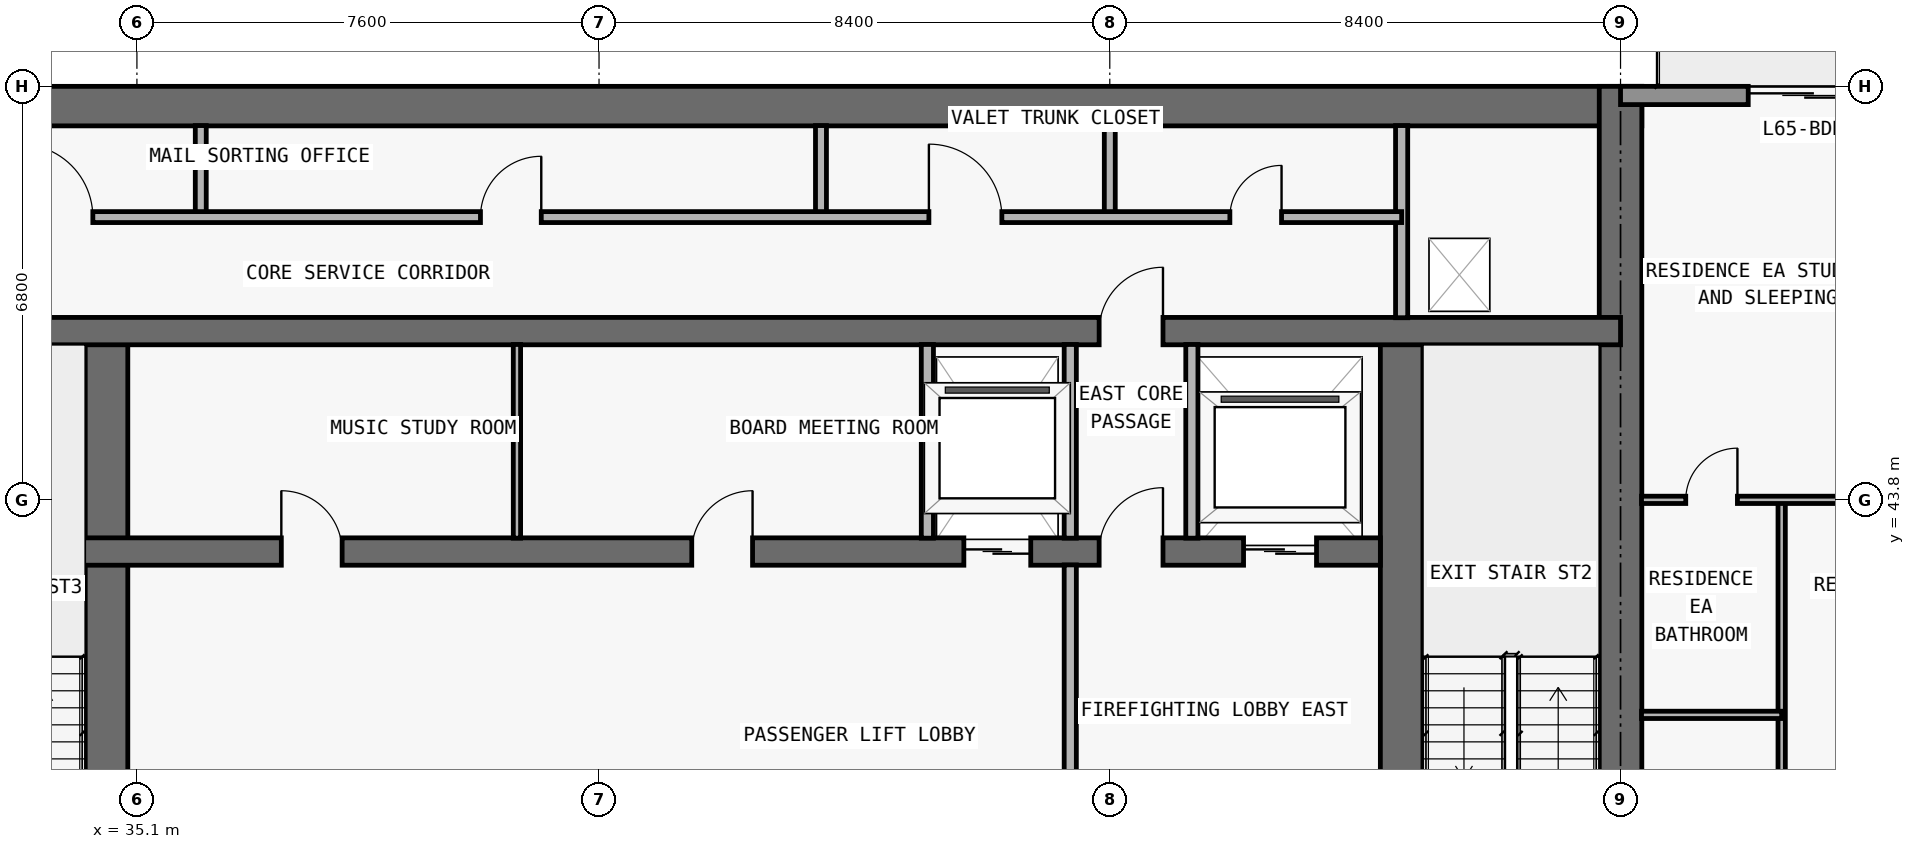
"""IFC4 building model, lengths in metres.
Left out: names, types, materials, properties, quantities, classifications, styles, units other than length and angle.
Written with IfcOpenShell. Run it as: python <this file> out.ifc"""

import sys

from ifc_helpers import new_model, si_unit, direction, frame, frame_2d, origin, place, context, subcontext, project, spatial, rectangle, extrude, element, fill, save


model = new_model("IFC4")
c1 = context("Model", 3, precision=1e-05, world=origin(), true_north=direction((0.0, 1.0)))
c2 = subcontext(c1, "Body", "Model", "MODEL_VIEW")
j1 = project(units=[si_unit("LENGTHUNIT", "METRE"), si_unit("PLANEANGLEUNIT", "RADIAN")], contexts=[c1])
p1 = place(None, origin())
s1 = spatial("IfcSite", under=j1, at=p1, CompositionType="ELEMENT")
p2 = place(p1, origin())
s2 = spatial("IfcBuilding", under=s1, at=p2, CompositionType="ELEMENT")
p3 = place(p2, frame((0.0, 0.0, 233.1)))
s3 = spatial("IfcBuildingStorey", under=s2, at=p3, CompositionType="ELEMENT", Elevation=233.1)
p4 = place(p3, frame((17.95, 50.275, 0.0), z_axis=(0.0, 0.0, 1.0), x_axis=(1.0, 0.0, 0.0)))
e1 = element("IfcWall", 1, at=p4, inside=s3, PredefinedType="SHEAR", context=c2, shape_type="SweptSolid", body=[
    extrude(rectangle(XDim=41.9, YDim=0.65, at=frame_2d((20.95, 0.0))), origin(), (0.0, 0.0, 1.0), 3.05),
])
p5 = place(p3, frame((59.5, 36.65, 0.0), z_axis=(0.0, 0.0, 1.0), x_axis=(0.0, 1.0, 0.0)))
e2 = element("IfcWall", 2, at=p5, inside=s3, PredefinedType="SHEAR", context=c2, shape_type="SweptSolid", body=[
    extrude(rectangle(XDim=13.95, YDim=0.7, at=frame_2d((6.975, 0.0))), origin(), (0.0, 0.0, 1.0), 3.05),
])
p6 = place(p3, frame((55.9, 37.0, 0.0), z_axis=(0.0, 0.0, 1.0), x_axis=(0.0, 1.0, 0.0)))
e3 = element("IfcWall", 3, at=p6, inside=s3, PredefinedType="SHEAR", context=c2, shape_type="SweptSolid", body=[
    extrude(rectangle(XDim=9.575, YDim=0.7, at=frame_2d((4.788, 0.0))), origin(), (0.0, 0.0, 1.0), 3.05),
])
p7 = place(p6, frame((0.55, 0.0, 0.0)))
e4 = element("IfcOpeningElement", 4, at=p7, cuts=e3, PredefinedType="OPENING", context=c2, shape_type="SweptSolid", body=[
    extrude(rectangle(XDim=1.1, YDim=2.15, at=frame_2d((0.55, 1.075))), frame((0.0, 0.36, 0.0), z_axis=(0.0, -1.0, 0.0), x_axis=(1.0, 0.0, 0.0)), (0.0, 0.0, 1.0), 0.72),
])
p8 = place(p3, frame((34.6, 37.0, 0.0), z_axis=(0.0, 0.0, 1.0), x_axis=(0.0, 1.0, 0.0)))
e5 = element("IfcWall", 5, at=p8, inside=s3, PredefinedType="SHEAR", context=c2, shape_type="SweptSolid", body=[
    extrude(rectangle(XDim=9.575, YDim=0.7, at=frame_2d((4.788, 0.0))), origin(), (0.0, 0.0, 1.0), 3.05),
])
p9 = place(p3, frame((22.25, 42.95, 0.0), z_axis=(0.0, 0.0, 1.0), x_axis=(1.0, 0.0, 0.0)))
e6 = element("IfcWall", 6, at=p9, inside=s3, PredefinedType="SHEAR", context=c2, shape_type="SweptSolid", body=[
    extrude(rectangle(XDim=33.3, YDim=0.45, at=frame_2d((16.65, 0.0))), origin(), (0.0, 0.0, 1.0), 3.05),
])
p10 = place(p9, frame((1.05, 0.0, 0.0)))
e7 = element("IfcOpeningElement", 7, at=p10, cuts=e6, PredefinedType="OPENING", context=c2, shape_type="SweptSolid", body=[
    extrude(rectangle(XDim=1.2, YDim=2.2, at=frame_2d((0.6, 1.1))), frame((0.0, 0.235, 0.0), z_axis=(0.0, -1.0, 0.0), x_axis=(1.0, 0.0, 0.0)), (0.0, 0.0, 1.0), 0.47),
])
p11 = place(p9, frame((31.05, 0.0, 0.0)))
e8 = element("IfcOpeningElement", 8, at=p11, cuts=e6, PredefinedType="OPENING", context=c2, shape_type="SweptSolid", body=[
    extrude(rectangle(XDim=1.2, YDim=2.2, at=frame_2d((0.6, 1.1))), frame((0.0, 0.235, 0.0), z_axis=(0.0, -1.0, 0.0), x_axis=(1.0, 0.0, 0.0)), (0.0, 0.0, 1.0), 0.47),
])
p12 = place(p9, frame((26.45, 0.0, 0.0)))
e9 = element("IfcOpeningElement", 9, at=p12, cuts=e6, PredefinedType="OPENING", context=c2, shape_type="SweptSolid", body=[
    extrude(rectangle(XDim=1.1, YDim=2.2, at=frame_2d((0.55, 1.1))), frame((0.0, 0.235, 0.0), z_axis=(0.0, -1.0, 0.0), x_axis=(1.0, 0.0, 0.0)), (0.0, 0.0, 1.0), 0.47),
])
p13 = place(p9, frame((5.95, 0.0, 0.0)))
e10 = element("IfcOpeningElement", 10, at=p13, cuts=e6, PredefinedType="OPENING", context=c2, shape_type="SweptSolid", body=[
    extrude(rectangle(XDim=1.1, YDim=2.2, at=frame_2d((0.55, 1.1))), frame((0.0, 0.235, 0.0), z_axis=(0.0, -1.0, 0.0), x_axis=(1.0, 0.0, 0.0)), (0.0, 0.0, 1.0), 0.47),
])
p14 = place(p9, frame((3.625, 0.0, 0.0)))
e11 = element("IfcOpeningElement", 11, at=p14, cuts=e6, PredefinedType="OPENING", context=c2, shape_type="SweptSolid", body=[
    extrude(rectangle(XDim=1.05, YDim=2.15, at=frame_2d((0.525, 1.075))), frame((0.0, 0.235, 0.0), z_axis=(0.0, -1.0, 0.0), x_axis=(1.0, 0.0, 0.0)), (0.0, 0.0, 1.0), 0.47),
])
p15 = place(p9, frame((28.675, 0.0, 0.0)))
e12 = element("IfcOpeningElement", 12, at=p15, cuts=e6, PredefinedType="OPENING", context=c2, shape_type="SweptSolid", body=[
    extrude(rectangle(XDim=1.05, YDim=2.15, at=frame_2d((0.525, 1.075))), frame((0.0, 0.235, 0.0), z_axis=(0.0, -1.0, 0.0), x_axis=(1.0, 0.0, 0.0)), (0.0, 0.0, 1.0), 0.47),
])
p16 = place(p9, frame((15.225, 0.0, 0.0)))
e13 = element("IfcOpeningElement", 13, at=p16, cuts=e6, PredefinedType="OPENING", context=c2, shape_type="SweptSolid", body=[
    extrude(rectangle(XDim=1.0, YDim=2.2, at=frame_2d((0.5, 1.1))), frame((0.0, 0.235, 0.0), z_axis=(0.0, -1.0, 0.0), x_axis=(1.0, 0.0, 0.0)), (0.0, 0.0, 1.0), 0.47),
])
p17 = place(p9, frame((21.975, 0.0, 0.0)))
e14 = element("IfcOpeningElement", 14, at=p17, cuts=e6, PredefinedType="OPENING", context=c2, shape_type="SweptSolid", body=[
    extrude(rectangle(XDim=1.0, YDim=2.2, at=frame_2d((0.5, 1.1))), frame((0.0, 0.235, 0.0), z_axis=(0.0, -1.0, 0.0), x_axis=(1.0, 0.0, 0.0)), (0.0, 0.0, 1.0), 0.47),
])
p18 = place(p3, frame((18.3, 46.575, 0.0), z_axis=(0.0, 0.0, 1.0), x_axis=(1.0, 0.0, 0.0)))
e15 = element("IfcWall", 15, at=p18, inside=s3, PredefinedType="SHEAR", context=c2, shape_type="SweptSolid", body=[
    extrude(rectangle(XDim=41.2, YDim=0.45, at=frame_2d((20.6, 0.0))), origin(), (0.0, 0.0, 1.0), 3.05),
])
p19 = place(p18, frame((7.575, 0.0, 0.0)))
e16 = element("IfcOpeningElement", 16, at=p19, cuts=e15, PredefinedType="OPENING", context=c2, shape_type="SweptSolid", body=[
    extrude(rectangle(XDim=1.05, YDim=2.15, at=frame_2d((0.525, 1.075))), frame((0.0, 0.235, 0.0), z_axis=(0.0, -1.0, 0.0), x_axis=(1.0, 0.0, 0.0)), (0.0, 0.0, 1.0), 0.47),
])
p20 = place(p18, frame((32.625, 0.0, 0.0)))
e17 = element("IfcOpeningElement", 17, at=p20, cuts=e15, PredefinedType="OPENING", context=c2, shape_type="SweptSolid", body=[
    extrude(rectangle(XDim=1.05, YDim=2.15, at=frame_2d((0.525, 1.075))), frame((0.0, 0.235, 0.0), z_axis=(0.0, -1.0, 0.0), x_axis=(1.0, 0.0, 0.0)), (0.0, 0.0, 1.0), 0.47),
])
p21 = place(p3, frame((59.5, 50.45, 0.0), z_axis=(0.0, 0.0, 1.0), x_axis=(1.0, 0.0, 0.0)))
e18 = element("IfcWall", 18, at=p21, inside=s3, PredefinedType="STANDARD", context=c2, shape_type="SweptSolid", body=[
    extrude(rectangle(XDim=6.2, YDim=0.3, at=frame_2d((3.1, 0.0))), origin(), (0.0, 0.0, 1.0), 3.05),
])
p22 = place(p21, frame((2.1, 0.0, 0.0)))
e19 = element("IfcOpeningElement", 19, at=p22, cuts=e18, PredefinedType="OPENING", context=c2, shape_type="SweptSolid", body=[
    extrude(rectangle(XDim=2.0, YDim=2.3, at=frame_2d((1.0, 1.15))), frame((0.0, 0.16, 0.0), z_axis=(0.0, -1.0, 0.0), x_axis=(1.0, 0.0, 0.0)), (0.0, 0.0, 1.0), 0.32),
])
p23 = place(p3, frame((36.15, 48.45, 0.0), z_axis=(0.0, 0.0, 1.0), x_axis=(0.0, 1.0, 0.0)))
e20 = element("IfcWall", 20, at=p23, inside=s3, PredefinedType="PARTITIONING", context=c2, shape_type="SweptSolid", body=[
    extrude(rectangle(XDim=1.505, YDim=0.18, at=frame_2d((0.752, 0.0))), origin(), (0.0, 0.0, 1.0), 3.05),
])
p24 = place(p3, frame((41.35, 43.17, 0.0), z_axis=(0.0, 0.0, 1.0), x_axis=(0.0, 1.0, 0.0)))
e21 = element("IfcWall", 21, at=p24, inside=s3, PredefinedType="PARTITIONING", context=c2, shape_type="SweptSolid", body=[
    extrude(rectangle(XDim=3.185, YDim=0.12, at=frame_2d((1.593, 0.0))), origin(), (0.0, 0.0, 1.0), 3.05),
])
p25 = place(p3, frame((46.35, 48.45, 0.0), z_axis=(0.0, 0.0, 1.0), x_axis=(0.0, 1.0, 0.0)))
e22 = element("IfcWall", 22, at=p25, inside=s3, PredefinedType="PARTITIONING", context=c2, shape_type="SweptSolid", body=[
    extrude(rectangle(XDim=1.505, YDim=0.18, at=frame_2d((0.752, 0.0))), origin(), (0.0, 0.0, 1.0), 3.05),
])
p26 = place(p3, frame((48.1, 43.17, 0.0), z_axis=(0.0, 0.0, 1.0), x_axis=(0.0, 1.0, 0.0)))
e23 = element("IfcWall", 23, at=p26, inside=s3, PredefinedType="PARTITIONING", context=c2, shape_type="SweptSolid", body=[
    extrude(rectangle(XDim=3.185, YDim=0.2, at=frame_2d((1.593, 0.0))), origin(), (0.0, 0.0, 1.0), 3.05),
])
p27 = place(p3, frame((50.45, 37.345, 0.0), z_axis=(0.0, 0.0, 1.0), x_axis=(0.0, 1.0, 0.0)))
e24 = element("IfcWall", 24, at=p27, inside=s3, PredefinedType="PARTITIONING", context=c2, shape_type="SweptSolid", body=[
    extrude(rectangle(XDim=5.385, YDim=0.2, at=frame_2d((2.692, 0.0))), origin(), (0.0, 0.0, 1.0), 3.05),
])
p28 = place(p3, frame((50.45, 43.17, 0.0), z_axis=(0.0, 0.0, 1.0), x_axis=(0.0, 1.0, 0.0)))
e25 = element("IfcWall", 25, at=p28, inside=s3, PredefinedType="PARTITIONING", context=c2, shape_type="SweptSolid", body=[
    extrude(rectangle(XDim=3.185, YDim=0.2, at=frame_2d((1.593, 0.0))), origin(), (0.0, 0.0, 1.0), 3.05),
])
p29 = place(p3, frame((51.1, 48.45, 0.0), z_axis=(0.0, 0.0, 1.0), x_axis=(0.0, 1.0, 0.0)))
e26 = element("IfcWall", 26, at=p29, inside=s3, PredefinedType="PARTITIONING", context=c2, shape_type="SweptSolid", body=[
    extrude(rectangle(XDim=1.505, YDim=0.18, at=frame_2d((0.752, 0.0))), origin(), (0.0, 0.0, 1.0), 3.05),
])
p30 = place(p3, frame((52.45, 43.17, 0.0), z_axis=(0.0, 0.0, 1.0), x_axis=(0.0, 1.0, 0.0)))
e27 = element("IfcWall", 27, at=p30, inside=s3, PredefinedType="PARTITIONING", context=c2, shape_type="SweptSolid", body=[
    extrude(rectangle(XDim=3.185, YDim=0.2, at=frame_2d((1.593, 0.0))), origin(), (0.0, 0.0, 1.0), 3.05),
])
p31 = place(p3, frame((55.9, 46.795, 0.0), z_axis=(0.0, 0.0, 1.0), x_axis=(0.0, 1.0, 0.0)))
e28 = element("IfcWall", 28, at=p31, inside=s3, PredefinedType="PARTITIONING", context=c2, shape_type="SweptSolid", body=[
    extrude(rectangle(XDim=3.16, YDim=0.2, at=frame_2d((1.58, 0.0))), origin(), (0.0, 0.0, 1.0), 3.05),
])
p32 = place(p3, frame((62.15, 37.0, 0.0), z_axis=(0.0, 0.0, 1.0), x_axis=(0.0, 1.0, 0.0)))
e29 = element("IfcWall", 29, at=p32, inside=s3, PredefinedType="PARTITIONING", context=c2, shape_type="SweptSolid", body=[
    extrude(rectangle(XDim=6.8, YDim=0.12, at=frame_2d((3.4, 0.0))), origin(), (0.0, 0.0, 1.0), 3.05),
])
p33 = place(p32, frame((1.207, 0.0, 0.0)))
e30 = element("IfcOpeningElement", 30, at=p33, cuts=e29, PredefinedType="OPENING", context=c2, shape_type="SweptSolid", body=[
    extrude(rectangle(XDim=0.85, YDim=2.1, at=frame_2d((0.425, 1.05))), frame((0.0, 0.07, 0.0), z_axis=(0.0, -1.0, 0.0), x_axis=(1.0, 0.0, 0.0)), (0.0, 0.0, 1.0), 0.14),
])
p34 = place(p3, frame((59.845, 40.264, 0.0), z_axis=(0.0, 0.0, 1.0), x_axis=(1.0, 0.0, 0.0)))
e31 = element("IfcWall", 31, at=p34, inside=s3, PredefinedType="PARTITIONING", context=c2, shape_type="SweptSolid", body=[
    extrude(rectangle(XDim=2.305, YDim=0.12, at=frame_2d((1.152, 0.0))), origin(), (0.0, 0.0, 1.0), 3.05),
])
p35 = place(p3, frame((59.845, 43.8, 0.0), z_axis=(0.0, 0.0, 1.0), x_axis=(1.0, 0.0, 0.0)))
e32 = element("IfcWall", 32, at=p35, inside=s3, PredefinedType="PARTITIONING", context=c2, shape_type="SweptSolid", body=[
    extrude(rectangle(XDim=9.56, YDim=0.12, at=frame_2d((4.78, 0.0))), origin(), (0.0, 0.0, 1.0), 2.418),
])
p36 = place(p35, frame((3.63, 0.0, 0.0)))
e33 = element("IfcOpeningElement", 33, at=p36, cuts=e32, PredefinedType="OPENING", context=c2, shape_type="SweptSolid", body=[
    extrude(rectangle(XDim=0.9, YDim=2.15, at=frame_2d((0.45, 1.075))), frame((0.0, 0.07, 0.0), z_axis=(0.0, -1.0, 0.0), x_axis=(1.0, 0.0, 0.0)), (0.0, 0.0, 1.0), 0.14),
])
p37 = place(p35, frame((0.728, 0.0, 0.0)))
e34 = element("IfcOpeningElement", 34, at=p37, cuts=e32, PredefinedType="OPENING", context=c2, shape_type="SweptSolid", body=[
    extrude(rectangle(XDim=0.85, YDim=2.1, at=frame_2d((0.425, 1.05))), frame((0.0, 0.07, 0.0), z_axis=(0.0, -1.0, 0.0), x_axis=(1.0, 0.0, 0.0)), (0.0, 0.0, 1.0), 0.14),
])
p38 = place(p3, frame((31.4, 48.45, 0.0), z_axis=(0.0, 0.0, 1.0), x_axis=(1.0, 0.0, 0.0)))
e35 = element("IfcWall", 35, at=p38, inside=s3, PredefinedType="PARTITIONING", context=c2, shape_type="SweptSolid", body=[
    extrude(rectangle(XDim=24.5, YDim=0.18, at=frame_2d((12.25, 0.0))), origin(), (0.0, 0.0, 1.0), 3.05),
])
p39 = place(p38, frame((1.775, 0.0, 0.0)))
e36 = element("IfcOpeningElement", 36, at=p39, cuts=e35, PredefinedType="OPENING", context=c2, shape_type="SweptSolid", body=[
    extrude(rectangle(XDim=1.2, YDim=2.2, at=frame_2d((0.6, 1.1))), frame((0.0, 0.1, 0.0), z_axis=(0.0, -1.0, 0.0), x_axis=(1.0, 0.0, 0.0)), (0.0, 0.0, 1.0), 0.2),
])
p40 = place(p38, frame((9.35, 0.0, 0.0)))
e37 = element("IfcOpeningElement", 37, at=p40, cuts=e35, PredefinedType="OPENING", context=c2, shape_type="SweptSolid", body=[
    extrude(rectangle(XDim=1.0, YDim=2.2, at=frame_2d((0.5, 1.1))), frame((0.0, 0.1, 0.0), z_axis=(0.0, -1.0, 0.0), x_axis=(1.0, 0.0, 0.0)), (0.0, 0.0, 1.0), 0.2),
])
p41 = place(p38, frame((16.725, 0.0, 0.0)))
e38 = element("IfcOpeningElement", 38, at=p41, cuts=e35, PredefinedType="OPENING", context=c2, shape_type="SweptSolid", body=[
    extrude(rectangle(XDim=1.2, YDim=2.2, at=frame_2d((0.6, 1.1))), frame((0.0, 0.1, 0.0), z_axis=(0.0, -1.0, 0.0), x_axis=(1.0, 0.0, 0.0)), (0.0, 0.0, 1.0), 0.2),
])
p42 = place(p38, frame((21.675, 0.0, 0.0)))
e39 = element("IfcOpeningElement", 39, at=p42, cuts=e35, PredefinedType="OPENING", context=c2, shape_type="SweptSolid", body=[
    extrude(rectangle(XDim=0.85, YDim=2.1, at=frame_2d((0.425, 1.05))), frame((0.0, 0.1, 0.0), z_axis=(0.0, -1.0, 0.0), x_axis=(1.0, 0.0, 0.0)), (0.0, 0.0, 1.0), 0.2),
])
p43 = place(p22, origin())
e40 = element("IfcDoor", 40, at=p43, inside=s3, OperationType="DOUBLE_DOOR_SLIDING", PredefinedType="DOOR", context=c2, shape_type="SweptSolid", body=[
    extrude(rectangle(XDim=2.0, YDim=2.3, at=frame_2d((1.0, 1.15))), frame((0.0, 0.025, 0.0), z_axis=(0.0, -1.0, 0.0), x_axis=(1.0, 0.0, 0.0)), (0.0, 0.0, 1.0), 0.05),
])
fill(e19, e40)
p44 = place(p11, origin())
e41 = element("IfcDoor", 41, at=p44, inside=s3, OperationType="DOUBLE_DOOR_SLIDING", PredefinedType="DOOR", context=c2, shape_type="SweptSolid", body=[
    extrude(rectangle(XDim=1.2, YDim=2.2, at=frame_2d((0.6, 1.1))), frame((0.0, 0.025, 0.0), z_axis=(0.0, -1.0, 0.0), x_axis=(1.0, 0.0, 0.0)), (0.0, 0.0, 1.0), 0.05),
])
fill(e8, e41)
p45 = place(p12, origin())
e42 = element("IfcDoor", 42, at=p45, inside=s3, OperationType="DOUBLE_DOOR_SLIDING", PredefinedType="DOOR", context=c2, shape_type="SweptSolid", body=[
    extrude(rectangle(XDim=1.1, YDim=2.2, at=frame_2d((0.55, 1.1))), frame((0.0, 0.025, 0.0), z_axis=(0.0, -1.0, 0.0), x_axis=(1.0, 0.0, 0.0)), (0.0, 0.0, 1.0), 0.05),
])
fill(e9, e42)
p46 = place(p15, origin())
e43 = element("IfcDoor", 43, at=p46, inside=s3, OperationType="SINGLE_SWING_RIGHT", PredefinedType="DOOR", context=c2, shape_type="SweptSolid", body=[
    extrude(rectangle(XDim=1.05, YDim=2.15, at=frame_2d((0.525, 1.075))), frame((0.0, 0.025, 0.0), z_axis=(0.0, -1.0, 0.0), x_axis=(1.0, 0.0, 0.0)), (0.0, 0.0, 1.0), 0.05),
])
fill(e12, e43)
p47 = place(p16, origin())
e44 = element("IfcDoor", 44, at=p47, inside=s3, OperationType="SINGLE_SWING_LEFT", PredefinedType="DOOR", context=c2, shape_type="SweptSolid", body=[
    extrude(rectangle(XDim=1.0, YDim=2.2, at=frame_2d((0.5, 1.1))), frame((0.0, 0.025, 0.0), z_axis=(0.0, -1.0, 0.0), x_axis=(1.0, 0.0, 0.0)), (0.0, 0.0, 1.0), 0.05),
])
fill(e13, e44)
p48 = place(p17, origin())
e45 = element("IfcDoor", 45, at=p48, inside=s3, OperationType="SINGLE_SWING_RIGHT", PredefinedType="DOOR", context=c2, shape_type="SweptSolid", body=[
    extrude(rectangle(XDim=1.0, YDim=2.2, at=frame_2d((0.5, 1.1))), frame((0.0, 0.025, 0.0), z_axis=(0.0, -1.0, 0.0), x_axis=(1.0, 0.0, 0.0)), (0.0, 0.0, 1.0), 0.05),
])
fill(e14, e45)
p49 = place(p20, origin())
e46 = element("IfcDoor", 46, at=p49, inside=s3, OperationType="SINGLE_SWING_RIGHT", PredefinedType="DOOR", context=c2, shape_type="SweptSolid", body=[
    extrude(rectangle(XDim=1.05, YDim=2.15, at=frame_2d((0.525, 1.075))), frame((0.0, 0.025, 0.0), z_axis=(0.0, -1.0, 0.0), x_axis=(1.0, 0.0, 0.0)), (0.0, 0.0, 1.0), 0.05),
])
fill(e17, e46)
p50 = place(p39, origin())
e47 = element("IfcDoor", 47, at=p50, inside=s3, OperationType="SINGLE_SWING_LEFT", PredefinedType="DOOR", context=c2, shape_type="SweptSolid", body=[
    extrude(rectangle(XDim=1.2, YDim=2.2, at=frame_2d((0.6, 1.1))), frame((0.0, 0.025, 0.0), z_axis=(0.0, -1.0, 0.0), x_axis=(1.0, 0.0, 0.0)), (0.0, 0.0, 1.0), 0.05),
])
fill(e36, e47)
p51 = place(p40, origin())
e48 = element("IfcDoor", 48, at=p51, inside=s3, OperationType="SINGLE_SWING_RIGHT", PredefinedType="DOOR", context=c2, shape_type="SweptSolid", body=[
    extrude(rectangle(XDim=1.0, YDim=2.2, at=frame_2d((0.5, 1.1))), frame((0.0, 0.025, 0.0), z_axis=(0.0, -1.0, 0.0), x_axis=(1.0, 0.0, 0.0)), (0.0, 0.0, 1.0), 0.05),
])
fill(e37, e48)
p52 = place(p41, origin())
e49 = element("IfcDoor", 49, at=p52, inside=s3, OperationType="SINGLE_SWING_LEFT", PredefinedType="DOOR", context=c2, shape_type="SweptSolid", body=[
    extrude(rectangle(XDim=1.2, YDim=2.2, at=frame_2d((0.6, 1.1))), frame((0.0, 0.025, 0.0), z_axis=(0.0, -1.0, 0.0), x_axis=(1.0, 0.0, 0.0)), (0.0, 0.0, 1.0), 0.05),
])
fill(e38, e49)
p53 = place(p42, origin())
e50 = element("IfcDoor", 50, at=p53, inside=s3, OperationType="SINGLE_SWING_RIGHT", PredefinedType="DOOR", context=c2, shape_type="SweptSolid", body=[
    extrude(rectangle(XDim=0.85, YDim=2.1, at=frame_2d((0.425, 1.05))), frame((0.0, 0.025, 0.0), z_axis=(0.0, -1.0, 0.0), x_axis=(1.0, 0.0, 0.0)), (0.0, 0.0, 1.0), 0.05),
])
fill(e39, e50)
p54 = place(p37, origin())
e51 = element("IfcDoor", 51, at=p54, inside=s3, OperationType="SINGLE_SWING_RIGHT", PredefinedType="DOOR", context=c2, shape_type="SweptSolid", body=[
    extrude(rectangle(XDim=0.85, YDim=2.1, at=frame_2d((0.425, 1.05))), frame((0.0, 0.025, 0.0), z_axis=(0.0, -1.0, 0.0), x_axis=(1.0, 0.0, 0.0)), (0.0, 0.0, 1.0), 0.05),
])
fill(e34, e51)
save(model, sys.argv[1])
